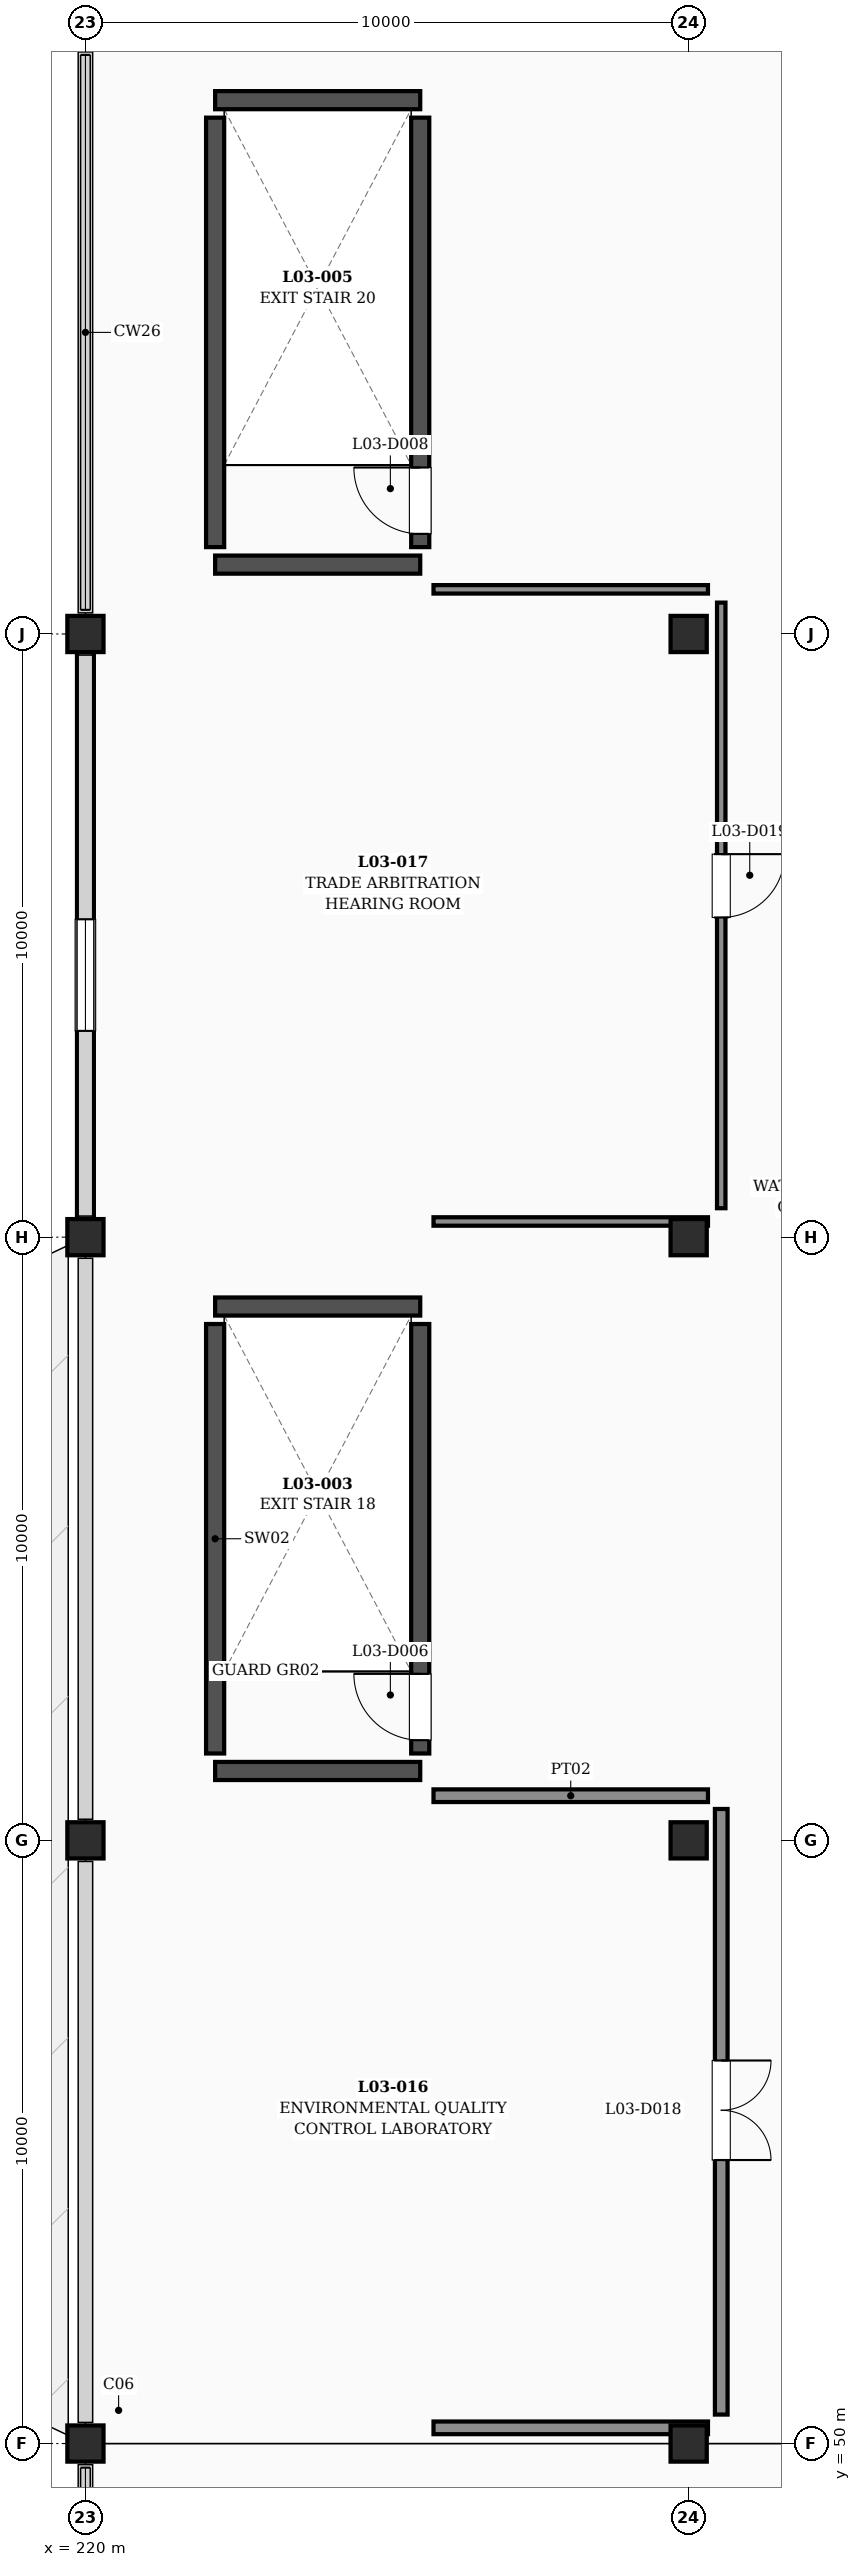
"""IFC4 building model, lengths in metres.
Left out: names, types, materials, properties, quantities, classifications, styles, units other than length and angle.
Written with IfcOpenShell. Run it as: python <this file> out.ifc"""

import sys

from ifc_helpers import new_model, si_unit, direction, frame, frame_2d, origin, origin_2d, place, context, subcontext, project, spatial, rectangle, extrude, element, fill, save


model = new_model("IFC4")
c1 = context("Model", 3, precision=1e-05, world=origin(), true_north=direction((0.0, 1.0)))
c2 = subcontext(c1, "Body", "Model", "MODEL_VIEW")
j1 = project(units=[si_unit("LENGTHUNIT", "METRE"), si_unit("PLANEANGLEUNIT", "RADIAN")], contexts=[c1])
p1 = place(None, origin())
s1 = spatial("IfcSite", under=j1, at=p1, CompositionType="ELEMENT")
p2 = place(p1, origin())
s2 = spatial("IfcBuilding", under=s1, at=p2, CompositionType="ELEMENT")
p3 = place(p2, frame((0.0, 0.0, 15.0)))
s3 = spatial("IfcBuildingStorey", under=s2, at=p3, CompositionType="ELEMENT", Elevation=15.0)
for number, where, z_axis, x_axis in (
    (1, (220.0, 50.0, 0.0), (0.0, 0.0, 1.0), (1.0, 0.0, 0.0)),
    (2, (220.0, 60.0, 0.0), (0.0, 0.0, 1.0), (1.0, 0.0, 0.0)),
    (3, (220.0, 70.0, 0.0), (0.0, 0.0, 1.0), (1.0, 0.0, 0.0)),
    (4, (220.0, 80.0, 0.0), (0.0, 0.0, 1.0), (1.0, 0.0, 0.0)),
    (5, (230.0, 50.0, 0.0), (0.0, 0.0, 1.0), (1.0, 0.0, 0.0)),
    (6, (230.0, 60.0, 0.0), (0.0, 0.0, 1.0), (1.0, 0.0, 0.0)),
    (7, (230.0, 70.0, 0.0), (0.0, 0.0, 1.0), (1.0, 0.0, 0.0)),
    (8, (230.0, 80.0, 0.0), (0.0, 0.0, 1.0), (1.0, 0.0, 0.0)),
):
    element("IfcColumn", number, at=place(p3, frame(where, z_axis=z_axis, x_axis=x_axis)), inside=s3, PredefinedType="COLUMN", context=c2, shape_type="SweptSolid", body=[
        extrude(rectangle(XDim=0.6, YDim=0.6, at=origin_2d()), origin(), (0.0, 0.0, 1.0), 4.2),
    ])
p4 = place(p3, frame((220.0, 70.22, 0.0), z_axis=(0.0, 0.0, 1.0), x_axis=(0.0, 1.0, 0.0)))
e9 = element("IfcWall", 9, at=p4, inside=s3, PredefinedType="SOLIDWALL", context=c2, shape_type="SweptSolid", body=[
    extrude(rectangle(XDim=9.56, YDim=0.28, at=frame_2d((4.78, 0.0))), origin(), (0.0, 0.0, 1.0), 3.28),
])
p5 = place(p4, frame((3.2, 0.0, 0.95)))
e10 = element("IfcOpeningElement", 10, at=p5, cuts=e9, PredefinedType="OPENING", context=c2, shape_type="SweptSolid", body=[
    extrude(rectangle(XDim=1.85, YDim=1.7, at=frame_2d((0.925, 0.85))), frame((0.0, 0.15, 0.0), z_axis=(0.0, -1.0, 0.0), x_axis=(1.0, 0.0, 0.0)), (0.0, 0.0, 1.0), 0.3),
])
for number, where, z_axis, x_axis in (
    (11, (220.0, 40.35, 4.2), (0.0, 0.0, 1.0), (0.0, 1.0, 0.0)),
    (12, (220.0, 50.35, 4.2), (0.0, 0.0, 1.0), (0.0, 1.0, 0.0)),
    (13, (220.0, 60.35, 4.2), (0.0, 0.0, 1.0), (0.0, 1.0, 0.0)),
    (14, (220.0, 70.35, 4.2), (0.0, 0.0, 1.0), (0.0, 1.0, 0.0)),
    (15, (220.0, 80.35, 4.2), (0.0, 0.0, 1.0), (0.0, 1.0, 0.0)),
):
    element("IfcWall", number, at=place(p3, frame(where, z_axis=z_axis, x_axis=x_axis)), inside=s3, PredefinedType="PARAPET", context=c2, shape_type="SweptSolid", body=[
        extrude(rectangle(XDim=9.3, YDim=0.24, at=frame_2d((4.65, 0.0))), origin(), (0.0, 0.0, 1.0), 1.15),
    ])
for number, where, z_axis, x_axis in (
    (16, (222.15, 61.15, 0.0), (0.0, 0.0, 1.0), (1.0, 0.0, 0.0)),
    (17, (222.15, 68.85, 0.0), (0.0, 0.0, 1.0), (1.0, 0.0, 0.0)),
):
    element("IfcWall", number, at=place(p3, frame(where, z_axis=z_axis, x_axis=x_axis)), inside=s3, PredefinedType="SHEAR", context=c2, shape_type="SweptSolid", body=[
        extrude(rectangle(XDim=3.4, YDim=0.3, at=frame_2d((1.7, 0.0))), origin(), (0.0, 0.0, 1.0), 4.0),
    ])
p6 = place(p3, frame((222.15, 61.44, 0.0), z_axis=(0.0, 0.0, 1.0), x_axis=(0.0, 1.0, 0.0)))
e18 = element("IfcWall", 18, at=p6, inside=s3, PredefinedType="SHEAR", context=c2, shape_type="SweptSolid", body=[
    extrude(rectangle(XDim=7.12, YDim=0.3, at=frame_2d((3.56, 0.0))), origin(), (0.0, 0.0, 1.0), 4.0),
])
p7 = place(p3, frame((225.55, 61.44, 0.0), z_axis=(0.0, 0.0, 1.0), x_axis=(0.0, 1.0, 0.0)))
e19 = element("IfcWall", 19, at=p7, inside=s3, PredefinedType="SHEAR", context=c2, shape_type="SweptSolid", body=[
    extrude(rectangle(XDim=7.12, YDim=0.3, at=frame_2d((3.56, 0.0))), origin(), (0.0, 0.0, 1.0), 4.0),
])
p8 = place(p7, frame((0.22, 0.0, 0.0)))
e20 = element("IfcOpeningElement", 20, at=p8, cuts=e19, PredefinedType="OPENING", context=c2, shape_type="SweptSolid", body=[
    extrude(rectangle(XDim=1.1, YDim=2.2, at=frame_2d((0.55, 1.1))), frame((0.0, 0.16, 0.0), z_axis=(0.0, -1.0, 0.0), x_axis=(1.0, 0.0, 0.0)), (0.0, 0.0, 1.0), 0.32),
])
for number, where, z_axis, x_axis in (
    (21, (222.15, 81.15, 0.0), (0.0, 0.0, 1.0), (1.0, 0.0, 0.0)),
    (22, (222.15, 88.85, 0.0), (0.0, 0.0, 1.0), (1.0, 0.0, 0.0)),
):
    element("IfcWall", number, at=place(p3, frame(where, z_axis=z_axis, x_axis=x_axis)), inside=s3, PredefinedType="SHEAR", context=c2, shape_type="SweptSolid", body=[
        extrude(rectangle(XDim=3.4, YDim=0.3, at=frame_2d((1.7, 0.0))), origin(), (0.0, 0.0, 1.0), 4.0),
    ])
p9 = place(p3, frame((222.15, 81.44, 0.0), z_axis=(0.0, 0.0, 1.0), x_axis=(0.0, 1.0, 0.0)))
e23 = element("IfcWall", 23, at=p9, inside=s3, PredefinedType="SHEAR", context=c2, shape_type="SweptSolid", body=[
    extrude(rectangle(XDim=7.12, YDim=0.3, at=frame_2d((3.56, 0.0))), origin(), (0.0, 0.0, 1.0), 4.0),
])
p10 = place(p3, frame((225.55, 81.44, 0.0), z_axis=(0.0, 0.0, 1.0), x_axis=(0.0, 1.0, 0.0)))
e24 = element("IfcWall", 24, at=p10, inside=s3, PredefinedType="SHEAR", context=c2, shape_type="SweptSolid", body=[
    extrude(rectangle(XDim=7.12, YDim=0.3, at=frame_2d((3.56, 0.0))), origin(), (0.0, 0.0, 1.0), 4.0),
])
p11 = place(p10, frame((0.22, 0.0, 0.0)))
e25 = element("IfcOpeningElement", 25, at=p11, cuts=e24, PredefinedType="OPENING", context=c2, shape_type="SweptSolid", body=[
    extrude(rectangle(XDim=1.1, YDim=2.2, at=frame_2d((0.55, 1.1))), frame((0.0, 0.16, 0.0), z_axis=(0.0, -1.0, 0.0), x_axis=(1.0, 0.0, 0.0)), (0.0, 0.0, 1.0), 0.32),
])
p12 = place(p3, frame((225.77, 60.74, 0.0), z_axis=(0.0, 0.0, 1.0), x_axis=(1.0, 0.0, 0.0)))
e26 = element("IfcWall", 26, at=p12, inside=s3, PredefinedType="PARTITIONING", context=c2, shape_type="SweptSolid", body=[
    extrude(rectangle(XDim=4.55, YDim=0.21, at=frame_2d((2.275, 0.0))), origin(), (0.0, 0.0, 1.0), 3.28),
])
p13 = place(p3, frame((230.54, 60.52, 0.0), z_axis=(0.0, 0.0, 1.0), x_axis=(0.0, -1.0, 0.0)))
e27 = element("IfcWall", 27, at=p13, inside=s3, PredefinedType="PARTITIONING", context=c2, shape_type="SweptSolid", body=[
    extrude(rectangle(XDim=10.04, YDim=0.21, at=frame_2d((5.02, 0.0))), origin(), (0.0, 0.0, 1.0), 3.28),
])
p14 = place(p13, frame((4.17, 0.0, 0.0)))
e28 = element("IfcOpeningElement", 28, at=p14, cuts=e27, PredefinedType="OPENING", context=c2, shape_type="SweptSolid", body=[
    extrude(rectangle(XDim=1.65, YDim=2.25, at=frame_2d((0.825, 1.125))), frame((0.0, 0.115, 0.0), z_axis=(0.0, -1.0, 0.0), x_axis=(1.0, 0.0, 0.0)), (0.0, 0.0, 1.0), 0.23),
])
p15 = place(p3, frame((230.32, 50.26, 0.0), z_axis=(0.0, 0.0, 1.0), x_axis=(-1.0, 0.0, 0.0)))
e29 = element("IfcWall", 29, at=p15, inside=s3, PredefinedType="PARTITIONING", context=c2, shape_type="SweptSolid", body=[
    extrude(rectangle(XDim=4.55, YDim=0.21, at=frame_2d((2.275, 0.0))), origin(), (0.0, 0.0, 1.0), 3.28),
])
p16 = place(p3, frame((225.77, 80.74, 0.0), z_axis=(0.0, 0.0, 1.0), x_axis=(1.0, 0.0, 0.0)))
e30 = element("IfcWall", 30, at=p16, inside=s3, PredefinedType="PARTITIONING", context=c2, shape_type="SweptSolid", body=[
    extrude(rectangle(XDim=4.55, YDim=0.14, at=frame_2d((2.275, 0.0))), origin(), (0.0, 0.0, 1.0), 3.96),
])
p17 = place(p3, frame((230.54, 80.52, 0.0), z_axis=(0.0, 0.0, 1.0), x_axis=(0.0, -1.0, 0.0)))
e31 = element("IfcWall", 31, at=p17, inside=s3, PredefinedType="PARTITIONING", context=c2, shape_type="SweptSolid", body=[
    extrude(rectangle(XDim=10.04, YDim=0.14, at=frame_2d((5.02, 0.0))), origin(), (0.0, 0.0, 1.0), 3.96),
])
p18 = place(p17, frame((4.17, 0.0, 0.0)))
e32 = element("IfcOpeningElement", 32, at=p18, cuts=e31, PredefinedType="OPENING", context=c2, shape_type="SweptSolid", body=[
    extrude(rectangle(XDim=1.05, YDim=2.25, at=frame_2d((0.525, 1.125))), frame((0.0, 0.08, 0.0), z_axis=(0.0, -1.0, 0.0), x_axis=(1.0, 0.0, 0.0)), (0.0, 0.0, 1.0), 0.16),
])
p19 = place(p3, frame((230.32, 70.26, 0.0), z_axis=(0.0, 0.0, 1.0), x_axis=(-1.0, 0.0, 0.0)))
e33 = element("IfcWall", 33, at=p19, inside=s3, PredefinedType="PARTITIONING", context=c2, shape_type="SweptSolid", body=[
    extrude(rectangle(XDim=4.55, YDim=0.14, at=frame_2d((2.275, 0.0))), origin(), (0.0, 0.0, 1.0), 3.28),
])
p20 = place(p5, origin())
e34 = element("IfcWindow", 34, at=p20, inside=s3, PartitioningType="SINGLE_PANEL", PredefinedType="WINDOW", context=c2, shape_type="SweptSolid", body=[
    extrude(rectangle(XDim=1.85, YDim=1.7, at=frame_2d((0.925, 0.85))), frame((0.0, 0.03, 0.0), z_axis=(0.0, -1.0, 0.0), x_axis=(1.0, 0.0, 0.0)), (0.0, 0.0, 1.0), 0.06),
])
fill(e10, e34)
p21 = place(p8, origin())
e35 = element("IfcDoor", 35, at=p21, inside=s3, OperationType="SINGLE_SWING_RIGHT", PredefinedType="DOOR", context=c2, shape_type="SweptSolid", body=[
    extrude(rectangle(XDim=1.1, YDim=2.2, at=frame_2d((0.55, 1.1))), frame((0.0, 0.025, 0.0), z_axis=(0.0, -1.0, 0.0), x_axis=(1.0, 0.0, 0.0)), (0.0, 0.0, 1.0), 0.05),
])
fill(e20, e35)
p22 = place(p11, origin())
e36 = element("IfcDoor", 36, at=p22, inside=s3, OperationType="SINGLE_SWING_RIGHT", PredefinedType="DOOR", context=c2, shape_type="SweptSolid", body=[
    extrude(rectangle(XDim=1.1, YDim=2.2, at=frame_2d((0.55, 1.1))), frame((0.0, 0.025, 0.0), z_axis=(0.0, -1.0, 0.0), x_axis=(1.0, 0.0, 0.0)), (0.0, 0.0, 1.0), 0.05),
])
fill(e25, e36)
p23 = place(p14, origin())
e37 = element("IfcDoor", 37, at=p23, inside=s3, OperationType="DOUBLE_DOOR_SINGLE_SWING", PredefinedType="DOOR", context=c2, shape_type="SweptSolid", body=[
    extrude(rectangle(XDim=1.65, YDim=2.25, at=frame_2d((0.825, 1.125))), frame((0.0, 0.025, 0.0), z_axis=(0.0, -1.0, 0.0), x_axis=(1.0, 0.0, 0.0)), (0.0, 0.0, 1.0), 0.05),
])
fill(e28, e37)
p24 = place(p18, origin())
e38 = element("IfcDoor", 38, at=p24, inside=s3, OperationType="SINGLE_SWING_LEFT", PredefinedType="DOOR", context=c2, shape_type="SweptSolid", body=[
    extrude(rectangle(XDim=1.05, YDim=2.25, at=frame_2d((0.525, 1.125))), frame((0.0, 0.025, 0.0), z_axis=(0.0, -1.0, 0.0), x_axis=(1.0, 0.0, 0.0)), (0.0, 0.0, 1.0), 0.05),
])
fill(e32, e38)
save(model, sys.argv[1])
